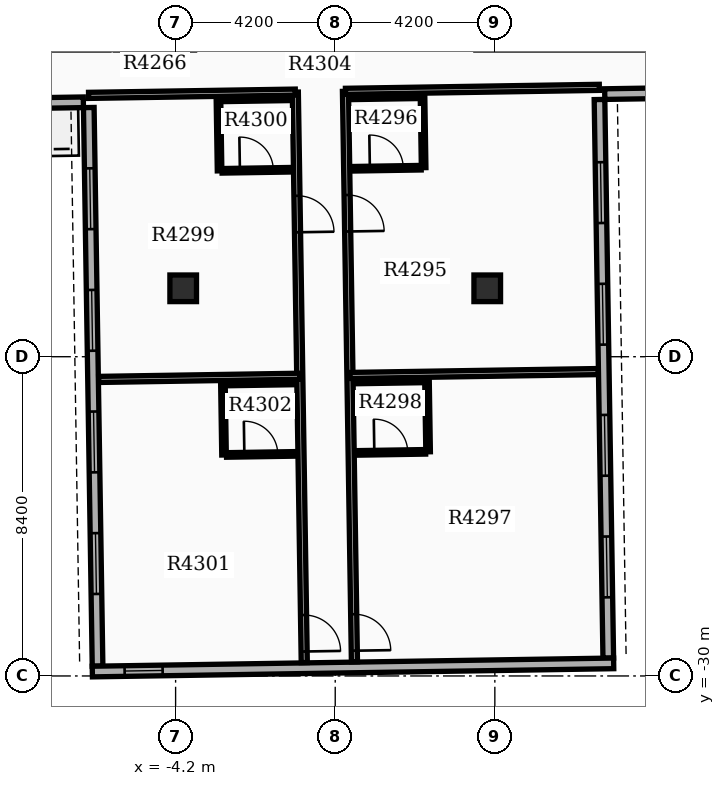
"""IFC4 building model, lengths in metres.
Left out: names, types, materials, properties, quantities, classifications, styles, units other than length and angle.
Written with IfcOpenShell. Run it as: python <this file> out.ifc"""

import sys

from ifc_helpers import new_model, si_unit, direction, frame, frame_2d, origin, origin_2d, place, context, subcontext, project, spatial, rectangle, extrude, element, fill, save


model = new_model("IFC4")
c1 = context("Model", 3, precision=1e-05, world=origin(), true_north=direction((0.0, 1.0)))
c2 = subcontext(c1, "Body", "Model", "MODEL_VIEW")
j1 = project(units=[si_unit("LENGTHUNIT", "METRE"), si_unit("PLANEANGLEUNIT", "RADIAN")], contexts=[c1])
p1 = place(None, origin())
s1 = spatial("IfcSite", under=j1, at=p1, CompositionType="ELEMENT")
p2 = place(p1, origin())
s2 = spatial("IfcBuilding", under=s1, at=p2, CompositionType="ELEMENT")
p3 = place(p2, frame((0.0, 0.0, 269.4)))
s3 = spatial("IfcBuildingStorey", under=s2, at=p3, CompositionType="ELEMENT", Elevation=269.4)
for number, where, z_axis, x_axis in (
    (1, (-4.0, -19.8, 0.0), (0.0, 0.0, 1.0), (1.0, 0.0, 0.0)),
    (2, (4.0, -19.8, 0.0), (0.0, 0.0, 1.0), (1.0, 0.0, 0.0)),
):
    element("IfcColumn", number, at=place(p3, frame(where, z_axis=z_axis, x_axis=x_axis)), inside=s3, PredefinedType="COLUMN", context=c2, shape_type="SweptSolid", body=[
        extrude(rectangle(XDim=0.7, YDim=0.7, at=origin_2d()), origin(), (0.0, 0.0, 1.0), 3.9),
    ])
p4 = place(p3, frame((-6.485, -15.044, 0.0), z_axis=(0.0, 0.0, 1.0), x_axis=(0.015711302158, -0.999876569875, 0.0)))
e3 = element("IfcWall", 3, at=p4, inside=s3, PredefinedType="STANDARD", context=c2, shape_type="SweptSolid", body=[
    extrude(rectangle(XDim=14.7, YDim=0.28, at=frame_2d((7.35, 0.0))), origin(), (0.0, 0.0, 1.0), 3.18),
])
p5 = place(p4, frame((1.6, 0.0, 0.8)))
e4 = element("IfcOpeningElement", 4, at=p5, cuts=e3, PredefinedType="OPENING", context=c2, shape_type="SweptSolid", body=[
    extrude(rectangle(XDim=1.6, YDim=1.7, at=frame_2d((0.8, 0.85))), frame((0.0, 0.15, 0.0), z_axis=(0.0, -1.0, 0.0), x_axis=(1.0, 0.0, 0.0)), (0.0, 0.0, 1.0), 0.3),
])
p6 = place(p4, frame((4.8, 0.0, 0.8)))
e5 = element("IfcOpeningElement", 5, at=p6, cuts=e3, PredefinedType="OPENING", context=c2, shape_type="SweptSolid", body=[
    extrude(rectangle(XDim=1.6, YDim=1.7, at=frame_2d((0.8, 0.85))), frame((0.0, 0.15, 0.0), z_axis=(0.0, -1.0, 0.0), x_axis=(1.0, 0.0, 0.0)), (0.0, 0.0, 1.0), 0.3),
])
p7 = place(p4, frame((8.0, 0.0, 0.8)))
e6 = element("IfcOpeningElement", 6, at=p7, cuts=e3, PredefinedType="OPENING", context=c2, shape_type="SweptSolid", body=[
    extrude(rectangle(XDim=1.6, YDim=1.7, at=frame_2d((0.8, 0.85))), frame((0.0, 0.15, 0.0), z_axis=(0.0, -1.0, 0.0), x_axis=(1.0, 0.0, 0.0)), (0.0, 0.0, 1.0), 0.3),
])
p8 = place(p4, frame((11.2, 0.0, 0.8)))
e7 = element("IfcOpeningElement", 7, at=p8, cuts=e3, PredefinedType="OPENING", context=c2, shape_type="SweptSolid", body=[
    extrude(rectangle(XDim=1.6, YDim=1.7, at=frame_2d((0.8, 0.85))), frame((0.0, 0.15, 0.0), z_axis=(0.0, -1.0, 0.0), x_axis=(1.0, 0.0, 0.0)), (0.0, 0.0, 1.0), 0.3),
])
p9 = place(p3, frame((7.185, -29.531, 0.0), z_axis=(0.0, 0.0, 1.0), x_axis=(-0.015711302158, 0.999876569875, 0.0)))
e8 = element("IfcWall", 8, at=p9, inside=s3, PredefinedType="STANDARD", context=c2, shape_type="SweptSolid", body=[
    extrude(rectangle(XDim=14.7, YDim=0.28, at=frame_2d((7.35, 0.0))), origin(), (0.0, 0.0, 1.0), 3.18),
])
p10 = place(p9, frame((1.6, 0.0, 0.8)))
e9 = element("IfcOpeningElement", 9, at=p10, cuts=e8, PredefinedType="OPENING", context=c2, shape_type="SweptSolid", body=[
    extrude(rectangle(XDim=1.6, YDim=1.7, at=frame_2d((0.8, 0.85))), frame((0.0, 0.15, 0.0), z_axis=(0.0, -1.0, 0.0), x_axis=(1.0, 0.0, 0.0)), (0.0, 0.0, 1.0), 0.3),
])
p11 = place(p9, frame((4.8, 0.0, 0.8)))
e10 = element("IfcOpeningElement", 10, at=p11, cuts=e8, PredefinedType="OPENING", context=c2, shape_type="SweptSolid", body=[
    extrude(rectangle(XDim=1.6, YDim=1.7, at=frame_2d((0.8, 0.85))), frame((0.0, 0.15, 0.0), z_axis=(0.0, -1.0, 0.0), x_axis=(1.0, 0.0, 0.0)), (0.0, 0.0, 1.0), 0.3),
])
p12 = place(p9, frame((8.25, 0.0, 0.8)))
e11 = element("IfcOpeningElement", 11, at=p12, cuts=e8, PredefinedType="OPENING", context=c2, shape_type="SweptSolid", body=[
    extrude(rectangle(XDim=1.6, YDim=1.7, at=frame_2d((0.8, 0.85))), frame((0.0, 0.15, 0.0), z_axis=(0.0, -1.0, 0.0), x_axis=(1.0, 0.0, 0.0)), (0.0, 0.0, 1.0), 0.3),
])
p13 = place(p9, frame((11.45, 0.0, 0.8)))
e12 = element("IfcOpeningElement", 12, at=p13, cuts=e8, PredefinedType="OPENING", context=c2, shape_type="SweptSolid", body=[
    extrude(rectangle(XDim=1.6, YDim=1.7, at=frame_2d((0.8, 0.85))), frame((0.0, 0.15, 0.0), z_axis=(0.0, -1.0, 0.0), x_axis=(1.0, 0.0, 0.0)), (0.0, 0.0, 1.0), 0.3),
])
p14 = place(p3, frame((-6.391, -29.884, 0.0), z_axis=(0.0, 0.0, 1.0), x_axis=(0.999876828887, 0.015694809807, 0.0)))
e13 = element("IfcWall", 13, at=p14, inside=s3, PredefinedType="STANDARD", context=c2, shape_type="SweptSolid", body=[
    extrude(rectangle(XDim=13.72, YDim=0.28, at=frame_2d((6.86, 0.0))), origin(), (0.0, 0.0, 1.0), 3.18),
])
p15 = place(p14, frame((0.85, 0.0, 0.85)))
e14 = element("IfcOpeningElement", 14, at=p15, cuts=e13, PredefinedType="OPENING", context=c2, shape_type="SweptSolid", body=[
    extrude(rectangle(XDim=1.0, YDim=1.5, at=frame_2d((0.5, 0.75))), frame((0.0, 0.15, 0.0), z_axis=(0.0, -1.0, 0.0), x_axis=(1.0, 0.0, 0.0)), (0.0, 0.0, 1.0), 0.3),
])
p16 = place(p3, frame((-12.926, -15.005, 0.0), z_axis=(0.0, 0.0, 1.0), x_axis=(0.999876823822, 0.015695132501, 0.0)))
e15 = element("IfcWall", 15, at=p16, inside=s3, PredefinedType="STANDARD", context=c2, shape_type="SweptSolid", body=[
    extrude(rectangle(XDim=6.3, YDim=0.28, at=frame_2d((3.15, 0.0))), origin(), (0.0, 0.0, 1.0), 3.18),
])
p17 = place(p3, frame((13.391, -14.592, 0.0), z_axis=(0.0, 0.0, 1.0), x_axis=(-0.999876833368, -0.015694524359, 0.0)))
e16 = element("IfcWall", 16, at=p17, inside=s3, PredefinedType="STANDARD", context=c2, shape_type="SweptSolid", body=[
    extrude(rectangle(XDim=6.3, YDim=0.28, at=frame_2d((3.15, 0.0))), origin(), (0.0, 0.0, 1.0), 3.18),
])
p18 = place(p3, frame((0.27, -14.618, 0.0), z_axis=(0.0, 0.0, 1.0), x_axis=(0.015726491309, -0.999876331089, 0.0)))
e17 = element("IfcWall", 17, at=p18, inside=s3, PredefinedType="PARTITIONING", context=c2, shape_type="SweptSolid", body=[
    extrude(rectangle(XDim=15.012, YDim=0.16, at=frame_2d((7.506, 0.0))), origin(), (0.0, 0.0, 1.0), 3.17),
])
p19 = place(p18, frame((2.728, 0.0, 0.0)))
e18 = element("IfcOpeningElement", 18, at=p19, cuts=e17, PredefinedType="OPENING", context=c2, shape_type="SweptSolid", body=[
    extrude(rectangle(XDim=0.96, YDim=2.15, at=frame_2d((0.48, 1.075))), frame((0.0, 0.09, 0.0), z_axis=(0.0, -1.0, 0.0), x_axis=(1.0, 0.0, 0.0)), (0.0, 0.0, 1.0), 0.18),
])
p20 = place(p18, frame((13.76, 0.0, 0.0)))
e19 = element("IfcOpeningElement", 19, at=p20, cuts=e17, PredefinedType="OPENING", context=c2, shape_type="SweptSolid", body=[
    extrude(rectangle(XDim=0.96, YDim=2.15, at=frame_2d((0.48, 1.075))), frame((0.0, 0.09, 0.0), z_axis=(0.0, -1.0, 0.0), x_axis=(1.0, 0.0, 0.0)), (0.0, 0.0, 1.0), 0.18),
])
p21 = place(p3, frame((0.27, -14.618, 0.0), z_axis=(0.0, 0.0, 1.0), x_axis=(0.999876502613, 0.015715582138, 0.0)))
e20 = element("IfcWall", 20, at=p21, inside=s3, PredefinedType="PARTITIONING", context=c2, shape_type="SweptSolid", body=[
    extrude(rectangle(XDim=6.68, YDim=0.16, at=frame_2d((3.34, 0.0))), origin(), (0.0, 0.0, 1.0), 3.17),
])
p22 = place(p3, frame((0.387, -22.094, 0.0), z_axis=(0.0, 0.0, 1.0), x_axis=(0.999876772323, 0.015698412933, 0.0)))
e21 = element("IfcWall", 21, at=p22, inside=s3, PredefinedType="PARTITIONING", context=c2, shape_type="SweptSolid", body=[
    extrude(rectangle(XDim=6.532, YDim=0.16, at=frame_2d((3.266, 0.0))), origin(), (0.0, 0.0, 1.0), 3.17),
])
p23 = place(p3, frame((0.442, -16.655, 0.0), z_axis=(0.0, 0.0, 1.0), x_axis=(0.999876836305, 0.015694337248, 0.0)))
e22 = element("IfcWall", 22, at=p23, inside=s3, PredefinedType="PARTITIONING", context=c2, shape_type="SweptSolid", body=[
    extrude(rectangle(XDim=1.82, YDim=0.12, at=frame_2d((0.91, 0.0))), origin(), (0.0, 0.0, 1.0), 3.17),
])
p24 = place(p23, frame((0.47, 0.0, 0.0)))
e23 = element("IfcOpeningElement", 23, at=p24, cuts=e22, PredefinedType="OPENING", context=c2, shape_type="SweptSolid", body=[
    extrude(rectangle(XDim=0.88, YDim=2.1, at=frame_2d((0.44, 1.05))), frame((0.0, 0.07, 0.0), z_axis=(0.0, -1.0, 0.0), x_axis=(1.0, 0.0, 0.0)), (0.0, 0.0, 1.0), 0.14),
])
p25 = place(p3, frame((0.412, -14.775, 0.0), z_axis=(0.0, 0.0, 1.0), x_axis=(0.999876836305, 0.015694337248, 0.0)))
e24 = element("IfcWall", 24, at=p25, inside=s3, PredefinedType="PARTITIONING", context=c2, shape_type="SweptSolid", body=[
    extrude(rectangle(XDim=1.82, YDim=0.12, at=frame_2d((0.91, 0.0))), origin(), (0.0, 0.0, 1.0), 3.17),
])
p26 = place(p3, frame((2.297, -14.746, 0.0), z_axis=(0.0, 0.0, 1.0), x_axis=(0.01571234584, -0.999876553475, 0.0)))
e25 = element("IfcWall", 25, at=p26, inside=s3, PredefinedType="PARTITIONING", context=c2, shape_type="SweptSolid", body=[
    extrude(rectangle(XDim=1.88, YDim=0.12, at=frame_2d((0.94, 0.0))), origin(), (0.0, 0.0, 1.0), 3.17),
])
p27 = place(p3, frame((0.559, -24.131, 0.0), z_axis=(0.0, 0.0, 1.0), x_axis=(0.999876836305, 0.015694337248, 0.0)))
e26 = element("IfcWall", 26, at=p27, inside=s3, PredefinedType="PARTITIONING", context=c2, shape_type="SweptSolid", body=[
    extrude(rectangle(XDim=1.82, YDim=0.12, at=frame_2d((0.91, 0.0))), origin(), (0.0, 0.0, 1.0), 3.17),
])
p28 = place(p27, frame((0.47, 0.0, 0.0)))
e27 = element("IfcOpeningElement", 27, at=p28, cuts=e26, PredefinedType="OPENING", context=c2, shape_type="SweptSolid", body=[
    extrude(rectangle(XDim=0.88, YDim=2.1, at=frame_2d((0.44, 1.05))), frame((0.0, 0.07, 0.0), z_axis=(0.0, -1.0, 0.0), x_axis=(1.0, 0.0, 0.0)), (0.0, 0.0, 1.0), 0.14),
])
p29 = place(p3, frame((0.53, -22.251, 0.0), z_axis=(0.0, 0.0, 1.0), x_axis=(0.999876836305, 0.015694337248, 0.0)))
e28 = element("IfcWall", 28, at=p29, inside=s3, PredefinedType="PARTITIONING", context=c2, shape_type="SweptSolid", body=[
    extrude(rectangle(XDim=1.82, YDim=0.12, at=frame_2d((0.91, 0.0))), origin(), (0.0, 0.0, 1.0), 3.17),
])
p30 = place(p3, frame((2.414, -22.222, 0.0), z_axis=(0.0, 0.0, 1.0), x_axis=(0.01571234584, -0.999876553475, 0.0)))
e29 = element("IfcWall", 29, at=p30, inside=s3, PredefinedType="PARTITIONING", context=c2, shape_type="SweptSolid", body=[
    extrude(rectangle(XDim=1.88, YDim=0.12, at=frame_2d((0.94, 0.0))), origin(), (0.0, 0.0, 1.0), 3.17),
])
p31 = place(p3, frame((-1.05, -14.638, 0.0), z_axis=(0.0, 0.0, 1.0), x_axis=(0.015709976686, -0.999876590701, 0.0)))
e30 = element("IfcWall", 30, at=p31, inside=s3, PredefinedType="PARTITIONING", context=c2, shape_type="SweptSolid", body=[
    extrude(rectangle(XDim=15.012, YDim=0.16, at=frame_2d((7.506, 0.0))), origin(), (0.0, 0.0, 1.0), 3.17),
])
p32 = place(p31, frame((2.728, 0.0, 0.0)))
e31 = element("IfcOpeningElement", 31, at=p32, cuts=e30, PredefinedType="OPENING", context=c2, shape_type="SweptSolid", body=[
    extrude(rectangle(XDim=0.96, YDim=2.15, at=frame_2d((0.48, 1.075))), frame((0.0, 0.09, 0.0), z_axis=(0.0, -1.0, 0.0), x_axis=(1.0, 0.0, 0.0)), (0.0, 0.0, 1.0), 0.18),
])
p33 = place(p31, frame((13.76, 0.0, 0.0)))
e32 = element("IfcOpeningElement", 32, at=p33, cuts=e30, PredefinedType="OPENING", context=c2, shape_type="SweptSolid", body=[
    extrude(rectangle(XDim=0.96, YDim=2.15, at=frame_2d((0.48, 1.075))), frame((0.0, 0.09, 0.0), z_axis=(0.0, -1.0, 0.0), x_axis=(1.0, 0.0, 0.0)), (0.0, 0.0, 1.0), 0.18),
])
p34 = place(p3, frame((-1.05, -14.638, 0.0), z_axis=(0.0, 0.0, 1.0), x_axis=(-0.999876622965, -0.015707923068, 0.0)))
e33 = element("IfcWall", 33, at=p34, inside=s3, PredefinedType="PARTITIONING", context=c2, shape_type="SweptSolid", body=[
    extrude(rectangle(XDim=5.44, YDim=0.16, at=frame_2d((2.72, 0.0))), origin(), (0.0, 0.0, 1.0), 3.17),
])
p35 = place(p3, frame((-0.933, -22.115, 0.0), z_axis=(0.0, 0.0, 1.0), x_axis=(-0.999876970397, -0.015685791996, 0.0)))
e34 = element("IfcWall", 34, at=p35, inside=s3, PredefinedType="PARTITIONING", context=c2, shape_type="SweptSolid", body=[
    extrude(rectangle(XDim=5.292, YDim=0.16, at=frame_2d((2.646, 0.0))), origin(), (0.0, 0.0, 1.0), 3.17),
])
p36 = place(p3, frame((-2.978, -16.709, 0.0), z_axis=(0.0, 0.0, 1.0), x_axis=(0.999876803258, 0.015696442504, 0.0)))
e35 = element("IfcWall", 35, at=p36, inside=s3, PredefinedType="PARTITIONING", context=c2, shape_type="SweptSolid", body=[
    extrude(rectangle(XDim=1.82, YDim=0.12, at=frame_2d((0.91, 0.0))), origin(), (0.0, 0.0, 1.0), 3.17),
])
p37 = place(p36, frame((0.47, 0.0, 0.0)))
e36 = element("IfcOpeningElement", 36, at=p37, cuts=e35, PredefinedType="OPENING", context=c2, shape_type="SweptSolid", body=[
    extrude(rectangle(XDim=0.88, YDim=2.1, at=frame_2d((0.44, 1.05))), frame((0.0, 0.07, 0.0), z_axis=(0.0, -1.0, 0.0), x_axis=(1.0, 0.0, 0.0)), (0.0, 0.0, 1.0), 0.14),
])
p38 = place(p3, frame((-3.007, -14.829, 0.0), z_axis=(0.0, 0.0, 1.0), x_axis=(0.999876803258, 0.015696442504, 0.0)))
e37 = element("IfcWall", 37, at=p38, inside=s3, PredefinedType="PARTITIONING", context=c2, shape_type="SweptSolid", body=[
    extrude(rectangle(XDim=1.82, YDim=0.12, at=frame_2d((0.91, 0.0))), origin(), (0.0, 0.0, 1.0), 3.17),
])
p39 = place(p3, frame((-3.073, -14.83, 0.0), z_axis=(0.0, 0.0, 1.0), x_axis=(0.01571234584, -0.999876553475, 0.0)))
e38 = element("IfcWall", 38, at=p39, inside=s3, PredefinedType="PARTITIONING", context=c2, shape_type="SweptSolid", body=[
    extrude(rectangle(XDim=1.88, YDim=0.12, at=frame_2d((0.94, 0.0))), origin(), (0.0, 0.0, 1.0), 3.17),
])
p40 = place(p3, frame((-2.861, -24.185, 0.0), z_axis=(0.0, 0.0, 1.0), x_axis=(0.999876836305, 0.015694337248, 0.0)))
e39 = element("IfcWall", 39, at=p40, inside=s3, PredefinedType="PARTITIONING", context=c2, shape_type="SweptSolid", body=[
    extrude(rectangle(XDim=1.82, YDim=0.12, at=frame_2d((0.91, 0.0))), origin(), (0.0, 0.0, 1.0), 3.17),
])
p41 = place(p40, frame((0.47, 0.0, 0.0)))
e40 = element("IfcOpeningElement", 40, at=p41, cuts=e39, PredefinedType="OPENING", context=c2, shape_type="SweptSolid", body=[
    extrude(rectangle(XDim=0.88, YDim=2.1, at=frame_2d((0.44, 1.05))), frame((0.0, 0.07, 0.0), z_axis=(0.0, -1.0, 0.0), x_axis=(1.0, 0.0, 0.0)), (0.0, 0.0, 1.0), 0.14),
])
p42 = place(p3, frame((-2.89, -22.305, 0.0), z_axis=(0.0, 0.0, 1.0), x_axis=(0.999876803258, 0.015696442504, 0.0)))
e41 = element("IfcWall", 41, at=p42, inside=s3, PredefinedType="PARTITIONING", context=c2, shape_type="SweptSolid", body=[
    extrude(rectangle(XDim=1.82, YDim=0.12, at=frame_2d((0.91, 0.0))), origin(), (0.0, 0.0, 1.0), 3.17),
])
p43 = place(p3, frame((-2.955, -22.306, 0.0), z_axis=(0.0, 0.0, 1.0), x_axis=(0.015714386166, -0.99987652141, 0.0)))
e42 = element("IfcWall", 42, at=p43, inside=s3, PredefinedType="PARTITIONING", context=c2, shape_type="SweptSolid", body=[
    extrude(rectangle(XDim=1.88, YDim=0.12, at=frame_2d((0.94, 0.0))), origin(), (0.0, 0.0, 1.0), 3.17),
])
p44 = place(p5, origin())
e43 = element("IfcWindow", 43, at=p44, inside=s3, PartitioningType="SINGLE_PANEL", PredefinedType="WINDOW", context=c2, shape_type="SweptSolid", body=[
    extrude(rectangle(XDim=1.6, YDim=1.7, at=frame_2d((0.8, 0.85))), frame((0.0, 0.03, 0.0), z_axis=(0.0, -1.0, 0.0), x_axis=(1.0, 0.0, 0.0)), (0.0, 0.0, 1.0), 0.06),
])
fill(e4, e43)
p45 = place(p6, origin())
e44 = element("IfcWindow", 44, at=p45, inside=s3, PartitioningType="SINGLE_PANEL", PredefinedType="WINDOW", context=c2, shape_type="SweptSolid", body=[
    extrude(rectangle(XDim=1.6, YDim=1.7, at=frame_2d((0.8, 0.85))), frame((0.0, 0.03, 0.0), z_axis=(0.0, -1.0, 0.0), x_axis=(1.0, 0.0, 0.0)), (0.0, 0.0, 1.0), 0.06),
])
fill(e5, e44)
p46 = place(p7, origin())
e45 = element("IfcWindow", 45, at=p46, inside=s3, PartitioningType="SINGLE_PANEL", PredefinedType="WINDOW", context=c2, shape_type="SweptSolid", body=[
    extrude(rectangle(XDim=1.6, YDim=1.7, at=frame_2d((0.8, 0.85))), frame((0.0, 0.03, 0.0), z_axis=(0.0, -1.0, 0.0), x_axis=(1.0, 0.0, 0.0)), (0.0, 0.0, 1.0), 0.06),
])
fill(e6, e45)
p47 = place(p8, origin())
e46 = element("IfcWindow", 46, at=p47, inside=s3, PartitioningType="SINGLE_PANEL", PredefinedType="WINDOW", context=c2, shape_type="SweptSolid", body=[
    extrude(rectangle(XDim=1.6, YDim=1.7, at=frame_2d((0.8, 0.85))), frame((0.0, 0.03, 0.0), z_axis=(0.0, -1.0, 0.0), x_axis=(1.0, 0.0, 0.0)), (0.0, 0.0, 1.0), 0.06),
])
fill(e7, e46)
p48 = place(p10, origin())
e47 = element("IfcWindow", 47, at=p48, inside=s3, PartitioningType="SINGLE_PANEL", PredefinedType="WINDOW", context=c2, shape_type="SweptSolid", body=[
    extrude(rectangle(XDim=1.6, YDim=1.7, at=frame_2d((0.8, 0.85))), frame((0.0, 0.03, 0.0), z_axis=(0.0, -1.0, 0.0), x_axis=(1.0, 0.0, 0.0)), (0.0, 0.0, 1.0), 0.06),
])
fill(e9, e47)
p49 = place(p11, origin())
e48 = element("IfcWindow", 48, at=p49, inside=s3, PartitioningType="SINGLE_PANEL", PredefinedType="WINDOW", context=c2, shape_type="SweptSolid", body=[
    extrude(rectangle(XDim=1.6, YDim=1.7, at=frame_2d((0.8, 0.85))), frame((0.0, 0.03, 0.0), z_axis=(0.0, -1.0, 0.0), x_axis=(1.0, 0.0, 0.0)), (0.0, 0.0, 1.0), 0.06),
])
fill(e10, e48)
p50 = place(p12, origin())
e49 = element("IfcWindow", 49, at=p50, inside=s3, PartitioningType="SINGLE_PANEL", PredefinedType="WINDOW", context=c2, shape_type="SweptSolid", body=[
    extrude(rectangle(XDim=1.6, YDim=1.7, at=frame_2d((0.8, 0.85))), frame((0.0, 0.03, 0.0), z_axis=(0.0, -1.0, 0.0), x_axis=(1.0, 0.0, 0.0)), (0.0, 0.0, 1.0), 0.06),
])
fill(e11, e49)
p51 = place(p13, origin())
e50 = element("IfcWindow", 50, at=p51, inside=s3, PartitioningType="SINGLE_PANEL", PredefinedType="WINDOW", context=c2, shape_type="SweptSolid", body=[
    extrude(rectangle(XDim=1.6, YDim=1.7, at=frame_2d((0.8, 0.85))), frame((0.0, 0.03, 0.0), z_axis=(0.0, -1.0, 0.0), x_axis=(1.0, 0.0, 0.0)), (0.0, 0.0, 1.0), 0.06),
])
fill(e12, e50)
p52 = place(p15, origin())
e51 = element("IfcWindow", 51, at=p52, inside=s3, PartitioningType="SINGLE_PANEL", PredefinedType="WINDOW", context=c2, shape_type="SweptSolid", body=[
    extrude(rectangle(XDim=1.0, YDim=1.5, at=frame_2d((0.5, 0.75))), frame((0.0, 0.03, 0.0), z_axis=(0.0, -1.0, 0.0), x_axis=(1.0, 0.0, 0.0)), (0.0, 0.0, 1.0), 0.06),
])
fill(e14, e51)
p53 = place(p19, origin())
e52 = element("IfcDoor", 52, at=p53, inside=s3, OperationType="SINGLE_SWING_RIGHT", PredefinedType="DOOR", context=c2, shape_type="SweptSolid", body=[
    extrude(rectangle(XDim=0.96, YDim=2.15, at=frame_2d((0.48, 1.075))), frame((0.0, 0.025, 0.0), z_axis=(0.0, -1.0, 0.0), x_axis=(1.0, 0.0, 0.0)), (0.0, 0.0, 1.0), 0.05),
])
fill(e18, e52)
p54 = place(p24, origin())
e53 = element("IfcDoor", 53, at=p54, inside=s3, OperationType="SINGLE_SWING_LEFT", PredefinedType="DOOR", context=c2, shape_type="SweptSolid", body=[
    extrude(rectangle(XDim=0.88, YDim=2.1, at=frame_2d((0.44, 1.05))), frame((0.0, 0.025, 0.0), z_axis=(0.0, -1.0, 0.0), x_axis=(1.0, 0.0, 0.0)), (0.0, 0.0, 1.0), 0.05),
])
fill(e23, e53)
p55 = place(p20, origin())
e54 = element("IfcDoor", 54, at=p55, inside=s3, OperationType="SINGLE_SWING_RIGHT", PredefinedType="DOOR", context=c2, shape_type="SweptSolid", body=[
    extrude(rectangle(XDim=0.96, YDim=2.15, at=frame_2d((0.48, 1.075))), frame((0.0, 0.025, 0.0), z_axis=(0.0, -1.0, 0.0), x_axis=(1.0, 0.0, 0.0)), (0.0, 0.0, 1.0), 0.05),
])
fill(e19, e54)
p56 = place(p28, origin())
e55 = element("IfcDoor", 55, at=p56, inside=s3, OperationType="SINGLE_SWING_LEFT", PredefinedType="DOOR", context=c2, shape_type="SweptSolid", body=[
    extrude(rectangle(XDim=0.88, YDim=2.1, at=frame_2d((0.44, 1.05))), frame((0.0, 0.025, 0.0), z_axis=(0.0, -1.0, 0.0), x_axis=(1.0, 0.0, 0.0)), (0.0, 0.0, 1.0), 0.05),
])
fill(e27, e55)
p57 = place(p32, origin())
e56 = element("IfcDoor", 56, at=p57, inside=s3, OperationType="SINGLE_SWING_RIGHT", PredefinedType="DOOR", context=c2, shape_type="SweptSolid", body=[
    extrude(rectangle(XDim=0.96, YDim=2.15, at=frame_2d((0.48, 1.075))), frame((0.0, 0.025, 0.0), z_axis=(0.0, -1.0, 0.0), x_axis=(1.0, 0.0, 0.0)), (0.0, 0.0, 1.0), 0.05),
])
fill(e31, e56)
p58 = place(p37, origin())
e57 = element("IfcDoor", 57, at=p58, inside=s3, OperationType="SINGLE_SWING_LEFT", PredefinedType="DOOR", context=c2, shape_type="SweptSolid", body=[
    extrude(rectangle(XDim=0.88, YDim=2.1, at=frame_2d((0.44, 1.05))), frame((0.0, 0.025, 0.0), z_axis=(0.0, -1.0, 0.0), x_axis=(1.0, 0.0, 0.0)), (0.0, 0.0, 1.0), 0.05),
])
fill(e36, e57)
p59 = place(p33, origin())
e58 = element("IfcDoor", 58, at=p59, inside=s3, OperationType="SINGLE_SWING_RIGHT", PredefinedType="DOOR", context=c2, shape_type="SweptSolid", body=[
    extrude(rectangle(XDim=0.96, YDim=2.15, at=frame_2d((0.48, 1.075))), frame((0.0, 0.025, 0.0), z_axis=(0.0, -1.0, 0.0), x_axis=(1.0, 0.0, 0.0)), (0.0, 0.0, 1.0), 0.05),
])
fill(e32, e58)
p60 = place(p41, origin())
e59 = element("IfcDoor", 59, at=p60, inside=s3, OperationType="SINGLE_SWING_LEFT", PredefinedType="DOOR", context=c2, shape_type="SweptSolid", body=[
    extrude(rectangle(XDim=0.88, YDim=2.1, at=frame_2d((0.44, 1.05))), frame((0.0, 0.025, 0.0), z_axis=(0.0, -1.0, 0.0), x_axis=(1.0, 0.0, 0.0)), (0.0, 0.0, 1.0), 0.05),
])
fill(e40, e59)
save(model, sys.argv[1])
